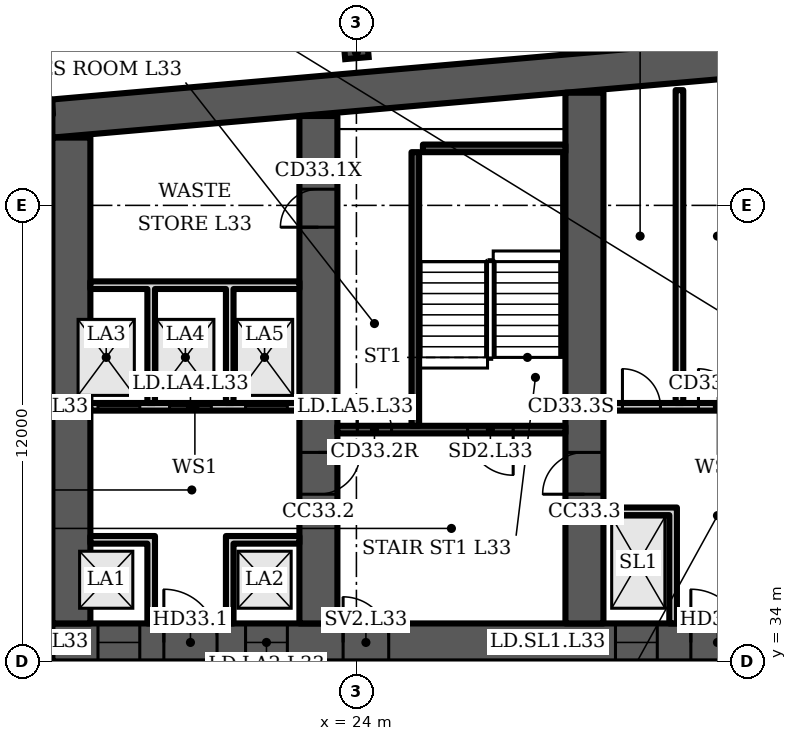
"""IFC4 building model, lengths in metres.
Left out: names, types, materials, properties, quantities, classifications, styles, units other than length and angle.
Written with IfcOpenShell. Run it as: python <this file> out.ifc"""

import sys

from ifc_helpers import new_model, si_unit, direction, frame, frame_2d, origin, origin_2d, place, context, subcontext, project, spatial, polyline, rectangle, i_section, outline, extrude, element, fill, save


model = new_model("IFC4")
c1 = context("Model", 3, precision=1e-05, world=origin(), true_north=direction((0.0, 1.0)))
c2 = subcontext(c1, "Body", "Model", "MODEL_VIEW")
j1 = project(units=[si_unit("LENGTHUNIT", "METRE"), si_unit("PLANEANGLEUNIT", "RADIAN")], contexts=[c1])
p1 = place(None, origin())
s1 = spatial("IfcSite", under=j1, at=p1, CompositionType="ELEMENT")
p2 = place(p1, origin())
s2 = spatial("IfcBuilding", under=s1, at=p2, CompositionType="ELEMENT")
p3 = place(p2, frame((0.0, 0.0, 139.9)))
s3 = spatial("IfcBuildingStorey", under=s2, at=p3, CompositionType="ELEMENT", Elevation=139.9)
p4 = place(p3, origin())
e1 = element("IfcWall", 1, at=p4, inside=s3, PredefinedType="SHEAR", context=c2, shape_type="SweptSolid", body=[
    extrude(outline(polyline([(16.0, 47.784), (40.5, 49.927), (65.0, 47.784), (65.0, 48.787), (40.5, 50.931), (16.0, 48.787), (16.0, 47.784)])), origin(), (0.0, 0.0, 1.0), 3.6),
])
p5 = place(p3, frame((16.0, 34.5, 0.0), z_axis=(0.0, 0.0, 1.0), x_axis=(1.0, 0.0, 0.0)))
e2 = element("IfcWall", 2, at=p5, inside=s3, PredefinedType="SHEAR", context=c2, shape_type="SweptSolid", body=[
    extrude(rectangle(XDim=49.0, YDim=1.0, at=frame_2d((24.5, 0.0))), origin(), (0.0, 0.0, 1.0), 3.6),
])
p6 = place(p5, frame((1.2, 0.0, 0.0)))
e3 = element("IfcOpeningElement", 3, at=p6, cuts=e2, PredefinedType="OPENING", context=c2, shape_type="SweptSolid", body=[
    extrude(rectangle(XDim=1.1, YDim=2.1, at=frame_2d((0.55, 1.05))), frame((0.0, 0.51, 0.0), z_axis=(0.0, -1.0, 0.0), x_axis=(1.0, 0.0, 0.0)), (0.0, 0.0, 1.0), 1.02),
])
p7 = place(p5, frame((5.083, 0.0, 0.0)))
e4 = element("IfcOpeningElement", 4, at=p7, cuts=e2, PredefinedType="OPENING", context=c2, shape_type="SweptSolid", body=[
    extrude(rectangle(XDim=1.1, YDim=2.1, at=frame_2d((0.55, 1.05))), frame((0.0, 0.51, 0.0), z_axis=(0.0, -1.0, 0.0), x_axis=(1.0, 0.0, 0.0)), (0.0, 0.0, 1.0), 1.02),
])
p8 = place(p5, frame((2.933, 0.0, 0.0)))
e5 = element("IfcOpeningElement", 5, at=p8, cuts=e2, PredefinedType="OPENING", context=c2, shape_type="SweptSolid", body=[
    extrude(rectangle(XDim=1.4, YDim=2.1, at=frame_2d((0.7, 1.05))), frame((0.0, 0.51, 0.0), z_axis=(0.0, -1.0, 0.0), x_axis=(1.0, 0.0, 0.0)), (0.0, 0.0, 1.0), 1.02),
])
p9 = place(p5, frame((7.65, 0.0, 0.0)))
e6 = element("IfcOpeningElement", 6, at=p9, cuts=e2, PredefinedType="OPENING", context=c2, shape_type="SweptSolid", body=[
    extrude(rectangle(XDim=1.2, YDim=2.1, at=frame_2d((0.6, 1.05))), frame((0.0, 0.51, 0.0), z_axis=(0.0, -1.0, 0.0), x_axis=(1.0, 0.0, 0.0)), (0.0, 0.0, 1.0), 1.02),
])
p10 = place(p5, frame((14.817, 0.0, 0.0)))
e7 = element("IfcOpeningElement", 7, at=p10, cuts=e2, PredefinedType="OPENING", context=c2, shape_type="SweptSolid", body=[
    extrude(rectangle(XDim=1.1, YDim=2.1, at=frame_2d((0.55, 1.05))), frame((0.0, 0.51, 0.0), z_axis=(0.0, -1.0, 0.0), x_axis=(1.0, 0.0, 0.0)), (0.0, 0.0, 1.0), 1.02),
])
p11 = place(p5, frame((19.083, 0.0, 0.0)))
e8 = element("IfcOpeningElement", 8, at=p11, cuts=e2, PredefinedType="OPENING", context=c2, shape_type="SweptSolid", body=[
    extrude(rectangle(XDim=1.1, YDim=2.1, at=frame_2d((0.55, 1.05))), frame((0.0, 0.51, 0.0), z_axis=(0.0, -1.0, 0.0), x_axis=(1.0, 0.0, 0.0)), (0.0, 0.0, 1.0), 1.02),
])
p12 = place(p5, frame((16.8, 0.0, 0.0)))
e9 = element("IfcOpeningElement", 9, at=p12, cuts=e2, PredefinedType="OPENING", context=c2, shape_type="SweptSolid", body=[
    extrude(rectangle(XDim=1.4, YDim=2.1, at=frame_2d((0.7, 1.05))), frame((0.0, 0.51, 0.0), z_axis=(0.0, -1.0, 0.0), x_axis=(1.0, 0.0, 0.0)), (0.0, 0.0, 1.0), 1.02),
])
p13 = place(p5, frame((21.817, 0.0, 0.0)))
e10 = element("IfcOpeningElement", 10, at=p13, cuts=e2, PredefinedType="OPENING", context=c2, shape_type="SweptSolid", body=[
    extrude(rectangle(XDim=1.1, YDim=2.1, at=frame_2d((0.55, 1.05))), frame((0.0, 0.51, 0.0), z_axis=(0.0, -1.0, 0.0), x_axis=(1.0, 0.0, 0.0)), (0.0, 0.0, 1.0), 1.02),
])
p14 = place(p5, frame((26.083, 0.0, 0.0)))
e11 = element("IfcOpeningElement", 11, at=p14, cuts=e2, PredefinedType="OPENING", context=c2, shape_type="SweptSolid", body=[
    extrude(rectangle(XDim=1.1, YDim=2.1, at=frame_2d((0.55, 1.05))), frame((0.0, 0.51, 0.0), z_axis=(0.0, -1.0, 0.0), x_axis=(1.0, 0.0, 0.0)), (0.0, 0.0, 1.0), 1.02),
])
p15 = place(p5, frame((33.15, 0.0, 0.0)))
e12 = element("IfcOpeningElement", 12, at=p15, cuts=e2, PredefinedType="OPENING", context=c2, shape_type="SweptSolid", body=[
    extrude(rectangle(XDim=1.2, YDim=2.1, at=frame_2d((0.6, 1.05))), frame((0.0, 0.51, 0.0), z_axis=(0.0, -1.0, 0.0), x_axis=(1.0, 0.0, 0.0)), (0.0, 0.0, 1.0), 1.02),
])
p16 = place(p5, frame((37.8, 0.0, 0.0)))
e13 = element("IfcOpeningElement", 13, at=p16, cuts=e2, PredefinedType="OPENING", context=c2, shape_type="SweptSolid", body=[
    extrude(rectangle(XDim=1.4, YDim=2.1, at=frame_2d((0.7, 1.05))), frame((0.0, 0.51, 0.0), z_axis=(0.0, -1.0, 0.0), x_axis=(1.0, 0.0, 0.0)), (0.0, 0.0, 1.0), 1.02),
])
p17 = place(p5, frame((42.817, 0.0, 0.0)))
e14 = element("IfcOpeningElement", 14, at=p17, cuts=e2, PredefinedType="OPENING", context=c2, shape_type="SweptSolid", body=[
    extrude(rectangle(XDim=1.1, YDim=2.1, at=frame_2d((0.55, 1.05))), frame((0.0, 0.51, 0.0), z_axis=(0.0, -1.0, 0.0), x_axis=(1.0, 0.0, 0.0)), (0.0, 0.0, 1.0), 1.02),
])
p18 = place(p5, frame((46.7, 0.0, 0.0)))
e15 = element("IfcOpeningElement", 15, at=p18, cuts=e2, PredefinedType="OPENING", context=c2, shape_type="SweptSolid", body=[
    extrude(rectangle(XDim=1.1, YDim=2.1, at=frame_2d((0.55, 1.05))), frame((0.0, 0.51, 0.0), z_axis=(0.0, -1.0, 0.0), x_axis=(1.0, 0.0, 0.0)), (0.0, 0.0, 1.0), 1.02),
])
p19 = place(p5, frame((44.667, 0.0, 0.0)))
e16 = element("IfcOpeningElement", 16, at=p19, cuts=e2, PredefinedType="OPENING", context=c2, shape_type="SweptSolid", body=[
    extrude(rectangle(XDim=1.4, YDim=2.1, at=frame_2d((0.7, 1.05))), frame((0.0, 0.51, 0.0), z_axis=(0.0, -1.0, 0.0), x_axis=(1.0, 0.0, 0.0)), (0.0, 0.0, 1.0), 1.02),
])
p20 = place(p3, frame((16.5, 35.0, 0.0), z_axis=(0.0, 0.0, 1.0), x_axis=(0.0, 1.0, 0.0)))
e17 = element("IfcWall", 17, at=p20, inside=s3, PredefinedType="SHEAR", context=c2, shape_type="SweptSolid", body=[
    extrude(rectangle(XDim=12.784, YDim=1.0, at=frame_2d((6.392, 0.0))), origin(), (0.0, 0.0, 1.0), 3.6),
])
p21 = place(p3, frame((23.0, 35.0, 0.0), z_axis=(0.0, 0.0, 1.0), x_axis=(0.0, 1.0, 0.0)))
e18 = element("IfcWall", 18, at=p21, inside=s3, PredefinedType="SHEAR", context=c2, shape_type="SweptSolid", body=[
    extrude(rectangle(XDim=13.352, YDim=1.0, at=frame_2d((6.676, 0.0))), origin(), (0.0, 0.0, 1.0), 3.6),
])
p22 = place(p21, frame((10.426, 0.0, 0.0)))
e19 = element("IfcOpeningElement", 19, at=p22, cuts=e18, PredefinedType="OPENING", context=c2, shape_type="SweptSolid", body=[
    extrude(rectangle(XDim=1.0, YDim=2.1, at=frame_2d((0.5, 1.05))), frame((0.0, 0.51, 0.0), z_axis=(0.0, -1.0, 0.0), x_axis=(1.0, 0.0, 0.0)), (0.0, 0.0, 1.0), 1.02),
])
p23 = place(p21, frame((3.4, 0.0, 0.0)))
e20 = element("IfcOpeningElement", 20, at=p23, cuts=e18, PredefinedType="OPENING", context=c2, shape_type="SweptSolid", body=[
    extrude(rectangle(XDim=1.1, YDim=2.1, at=frame_2d((0.55, 1.05))), frame((0.0, 0.51, 0.0), z_axis=(0.0, -1.0, 0.0), x_axis=(1.0, 0.0, 0.0)), (0.0, 0.0, 1.0), 1.02),
])
p24 = place(p3, frame((30.0, 35.0, 0.0), z_axis=(0.0, 0.0, 1.0), x_axis=(0.0, 1.0, 0.0)))
e21 = element("IfcWall", 21, at=p24, inside=s3, PredefinedType="SHEAR", context=c2, shape_type="SweptSolid", body=[
    extrude(rectangle(XDim=13.965, YDim=1.0, at=frame_2d((6.982, 0.0))), origin(), (0.0, 0.0, 1.0), 3.6),
])
p25 = place(p24, frame((3.4, 0.0, 0.0)))
e22 = element("IfcOpeningElement", 22, at=p25, cuts=e21, PredefinedType="OPENING", context=c2, shape_type="SweptSolid", body=[
    extrude(rectangle(XDim=1.1, YDim=2.1, at=frame_2d((0.55, 1.05))), frame((0.0, 0.51, 0.0), z_axis=(0.0, -1.0, 0.0), x_axis=(1.0, 0.0, 0.0)), (0.0, 0.0, 1.0), 1.02),
])
p26 = place(p3, frame((24.0, 50.027, 0.0), z_axis=(0.0, 0.0, 1.0), x_axis=(-0.087156, 0.996198, 0.0)))
e23 = element("IfcColumn", 23, at=p26, inside=s3, PredefinedType="COLUMN", context=c2, shape_type="SweptSolid", body=[
    extrude(i_section(OverallWidth=0.305, OverallDepth=0.62, WebThickness=0.021, FlangeThickness=0.04, FilletRadius=0.027, at=origin_2d()), origin(), (0.0, 0.0, 1.0), 3.6),
])
p27 = place(p3, frame((16.0, 48.587, 0.0), z_axis=(0.0, 0.0, 1.0), x_axis=(-0.996194, -0.087168, 0.0)))
e24 = element("IfcWall", 24, at=p27, inside=s3, PredefinedType="SOLIDWALL", context=c2, shape_type="SweptSolid", body=[
    extrude(rectangle(XDim=2.994, YDim=0.4, at=frame_2d((1.497, 0.0))), origin(), (0.0, 0.0, 1.0), 3.2),
])
p28 = place(p3, frame((17.0, 40.7, 0.0), z_axis=(0.0, 0.0, 1.0), x_axis=(1.0, 0.0, 0.0)))
e25 = element("IfcWall", 25, at=p28, inside=s3, PredefinedType="PARTITIONING", context=c2, shape_type="SweptSolid", body=[
    extrude(rectangle(XDim=5.5, YDim=0.2, at=frame_2d((2.75, 0.0))), origin(), (0.0, 0.0, 1.0), 3.2),
])
p29 = place(p28, frame((0.2, 0.0, 0.0)))
e26 = element("IfcOpeningElement", 26, at=p29, cuts=e25, PredefinedType="OPENING", context=c2, shape_type="SweptSolid", body=[
    extrude(rectangle(XDim=1.1, YDim=2.1, at=frame_2d((0.55, 1.05))), frame((0.0, 0.11, 0.0), z_axis=(0.0, -1.0, 0.0), x_axis=(1.0, 0.0, 0.0)), (0.0, 0.0, 1.0), 0.22),
])
p30 = place(p28, frame((2.083, 0.0, 0.0)))
e27 = element("IfcOpeningElement", 27, at=p30, cuts=e25, PredefinedType="OPENING", context=c2, shape_type="SweptSolid", body=[
    extrude(rectangle(XDim=1.1, YDim=2.1, at=frame_2d((0.55, 1.05))), frame((0.0, 0.11, 0.0), z_axis=(0.0, -1.0, 0.0), x_axis=(1.0, 0.0, 0.0)), (0.0, 0.0, 1.0), 0.22),
])
p31 = place(p28, frame((4.083, 0.0, 0.0)))
e28 = element("IfcOpeningElement", 28, at=p31, cuts=e25, PredefinedType="OPENING", context=c2, shape_type="SweptSolid", body=[
    extrude(rectangle(XDim=1.1, YDim=2.1, at=frame_2d((0.55, 1.05))), frame((0.0, 0.11, 0.0), z_axis=(0.0, -1.0, 0.0), x_axis=(1.0, 0.0, 0.0)), (0.0, 0.0, 1.0), 0.22),
])
p32 = place(p3, origin())
e29 = element("IfcWall", 29, at=p32, inside=s3, PredefinedType="PARTITIONING", context=c2, shape_type="SweptSolid", body=[
    extrude(outline(polyline([(18.5, 37.1), (17.0, 37.1), (17.0, 37.3), (18.5, 37.3), (18.7, 37.3), (18.7, 35.0), (18.5, 35.0), (18.5, 37.1)])), origin(), (0.0, 0.0, 1.0), 3.2),
])
p33 = place(p3, origin())
e30 = element("IfcWall", 30, at=p33, inside=s3, PredefinedType="PARTITIONING", context=c2, shape_type="SweptSolid", body=[
    extrude(outline(polyline([(20.567, 37.3), (20.767, 37.3), (22.5, 37.3), (22.5, 37.1), (20.767, 37.1), (20.767, 35.0), (20.567, 35.0), (20.567, 37.3)])), origin(), (0.0, 0.0, 1.0), 3.2),
])
p34 = place(p3, origin())
e31 = element("IfcWall", 31, at=p34, inside=s3, PredefinedType="PARTITIONING", context=c2, shape_type="SweptSolid", body=[
    extrude(outline(polyline([(18.7, 40.8), (18.5, 40.8), (18.5, 43.8), (17.0, 43.8), (17.0, 44.0), (22.5, 44.0), (22.5, 43.8), (20.767, 43.8), (20.767, 40.8), (20.567, 40.8), (20.567, 43.8), (18.7, 43.8), (18.7, 40.8)])), origin(), (0.0, 0.0, 1.0), 3.2),
])
p35 = place(p3, frame((23.5, 40.1, 0.0), z_axis=(0.0, 0.0, 1.0), x_axis=(1.0, 0.0, 0.0)))
e32 = element("IfcWall", 32, at=p35, inside=s3, PredefinedType="SHEAR", context=c2, shape_type="SweptSolid", body=[
    extrude(rectangle(XDim=6.0, YDim=0.2, at=frame_2d((3.0, 0.0))), origin(), (0.0, 0.0, 1.0), 3.2),
])
p36 = place(p35, frame((3.425, 0.0, 0.0)))
e33 = element("IfcOpeningElement", 33, at=p36, cuts=e32, PredefinedType="OPENING", context=c2, shape_type="SweptSolid", body=[
    extrude(rectangle(XDim=1.2, YDim=2.1, at=frame_2d((0.6, 1.05))), frame((0.0, 0.11, 0.0), z_axis=(0.0, -1.0, 0.0), x_axis=(1.0, 0.0, 0.0)), (0.0, 0.0, 1.0), 0.22),
])
p37 = place(p35, frame((0.525, 0.0, 0.0)))
e34 = element("IfcOpeningElement", 34, at=p37, cuts=e32, PredefinedType="OPENING", context=c2, shape_type="SweptSolid", body=[
    extrude(rectangle(XDim=0.9, YDim=2.1, at=frame_2d((0.45, 1.05))), frame((0.0, 0.11, 0.0), z_axis=(0.0, -1.0, 0.0), x_axis=(1.0, 0.0, 0.0)), (0.0, 0.0, 1.0), 0.22),
])
p38 = place(p3, frame((25.55, 40.2, 0.0), z_axis=(0.0, 0.0, 1.0), x_axis=(0.0, 1.0, 0.0)))
e35 = element("IfcWall", 35, at=p38, inside=s3, PredefinedType="SHEAR", context=c2, shape_type="SweptSolid", body=[
    extrude(rectangle(XDim=7.2, YDim=0.2, at=frame_2d((3.6, 0.0))), origin(), (0.0, 0.0, 1.0), 3.2),
])
p39 = place(p3, frame((25.75, 47.5, 0.0), z_axis=(0.0, 0.0, 1.0), x_axis=(1.0, 0.0, 0.0)))
e36 = element("IfcWall", 36, at=p39, inside=s3, PredefinedType="SHEAR", context=c2, shape_type="SweptSolid", body=[
    extrude(rectangle(XDim=3.75, YDim=0.2, at=frame_2d((1.875, 0.0))), origin(), (0.0, 0.0, 1.0), 3.2),
])
p40 = place(p3, frame((30.5, 40.7, 0.0), z_axis=(0.0, 0.0, 1.0), x_axis=(1.0, 0.0, 0.0)))
e37 = element("IfcWall", 37, at=p40, inside=s3, PredefinedType="PARTITIONING", context=c2, shape_type="SweptSolid", body=[
    extrude(rectangle(XDim=6.0, YDim=0.2, at=frame_2d((3.0, 0.0))), origin(), (0.0, 0.0, 1.0), 3.2),
])
p41 = place(p40, frame((0.5, 0.0, 0.0)))
e38 = element("IfcOpeningElement", 38, at=p41, cuts=e37, PredefinedType="OPENING", context=c2, shape_type="SweptSolid", body=[
    extrude(rectangle(XDim=1.0, YDim=2.1, at=frame_2d((0.5, 1.05))), frame((0.0, 0.11, 0.0), z_axis=(0.0, -1.0, 0.0), x_axis=(1.0, 0.0, 0.0)), (0.0, 0.0, 1.0), 0.22),
])
p42 = place(p40, frame((2.5, 0.0, 0.0)))
e39 = element("IfcOpeningElement", 39, at=p42, cuts=e37, PredefinedType="OPENING", context=c2, shape_type="SweptSolid", body=[
    extrude(rectangle(XDim=1.0, YDim=2.1, at=frame_2d((0.5, 1.05))), frame((0.0, 0.11, 0.0), z_axis=(0.0, -1.0, 0.0), x_axis=(1.0, 0.0, 0.0)), (0.0, 0.0, 1.0), 0.22),
])
p43 = place(p40, frame((4.5, 0.0, 0.0)))
e40 = element("IfcOpeningElement", 40, at=p43, cuts=e37, PredefinedType="OPENING", context=c2, shape_type="SweptSolid", body=[
    extrude(rectangle(XDim=1.0, YDim=2.1, at=frame_2d((0.5, 1.05))), frame((0.0, 0.11, 0.0), z_axis=(0.0, -1.0, 0.0), x_axis=(1.0, 0.0, 0.0)), (0.0, 0.0, 1.0), 0.22),
])
p44 = place(p3, origin())
e41 = element("IfcWall", 41, at=p44, inside=s3, PredefinedType="PARTITIONING", context=c2, shape_type="SweptSolid", body=[
    extrude(outline(polyline([(32.233, 37.85), (30.5, 37.85), (30.5, 38.05), (32.233, 38.05), (32.433, 38.05), (32.433, 35.0), (32.233, 35.0), (32.233, 37.85)])), origin(), (0.0, 0.0, 1.0), 3.2),
])
p45 = place(p3, frame((32.5, 40.8, 0.0), z_axis=(0.0, 0.0, 1.0), x_axis=(0.0, 1.0, 0.0)))
e42 = element("IfcWall", 42, at=p45, inside=s3, PredefinedType="PARTITIONING", context=c2, shape_type="SweptSolid", body=[
    extrude(rectangle(XDim=8.232, YDim=0.2, at=frame_2d((4.116, 0.0))), origin(), (0.0, 0.0, 1.0), 3.2),
])
p46 = place(p6, origin())
e43 = element("IfcDoor", 43, at=p46, inside=s3, OperationType="DOUBLE_DOOR_SLIDING", PredefinedType="DOOR", context=c2, shape_type="SweptSolid", body=[
    extrude(rectangle(XDim=1.1, YDim=2.1, at=frame_2d((0.55, 1.05))), frame((0.0, 0.025, 0.0), z_axis=(0.0, -1.0, 0.0), x_axis=(1.0, 0.0, 0.0)), (0.0, 0.0, 1.0), 0.05),
])
fill(e3, e43)
p47 = place(p7, origin())
e44 = element("IfcDoor", 44, at=p47, inside=s3, OperationType="DOUBLE_DOOR_SLIDING", PredefinedType="DOOR", context=c2, shape_type="SweptSolid", body=[
    extrude(rectangle(XDim=1.1, YDim=2.1, at=frame_2d((0.55, 1.05))), frame((0.0, 0.025, 0.0), z_axis=(0.0, -1.0, 0.0), x_axis=(1.0, 0.0, 0.0)), (0.0, 0.0, 1.0), 0.05),
])
fill(e4, e44)
p48 = place(p8, origin())
e45 = element("IfcDoor", 45, at=p48, inside=s3, OperationType="DOUBLE_DOOR_SINGLE_SWING", PredefinedType="DOOR", context=c2, shape_type="SweptSolid", body=[
    extrude(rectangle(XDim=1.4, YDim=2.1, at=frame_2d((0.7, 1.05))), frame((0.0, 0.025, 0.0), z_axis=(0.0, -1.0, 0.0), x_axis=(1.0, 0.0, 0.0)), (0.0, 0.0, 1.0), 0.05),
])
fill(e5, e45)
p49 = place(p29, origin())
e46 = element("IfcDoor", 46, at=p49, inside=s3, OperationType="DOUBLE_DOOR_SLIDING", PredefinedType="DOOR", context=c2, shape_type="SweptSolid", body=[
    extrude(rectangle(XDim=1.1, YDim=2.1, at=frame_2d((0.55, 1.05))), frame((0.0, 0.025, 0.0), z_axis=(0.0, -1.0, 0.0), x_axis=(1.0, 0.0, 0.0)), (0.0, 0.0, 1.0), 0.05),
])
fill(e26, e46)
p50 = place(p30, origin())
e47 = element("IfcDoor", 47, at=p50, inside=s3, OperationType="DOUBLE_DOOR_SLIDING", PredefinedType="DOOR", context=c2, shape_type="SweptSolid", body=[
    extrude(rectangle(XDim=1.1, YDim=2.1, at=frame_2d((0.55, 1.05))), frame((0.0, 0.025, 0.0), z_axis=(0.0, -1.0, 0.0), x_axis=(1.0, 0.0, 0.0)), (0.0, 0.0, 1.0), 0.05),
])
fill(e27, e47)
p51 = place(p31, origin())
e48 = element("IfcDoor", 48, at=p51, inside=s3, OperationType="DOUBLE_DOOR_SLIDING", PredefinedType="DOOR", context=c2, shape_type="SweptSolid", body=[
    extrude(rectangle(XDim=1.1, YDim=2.1, at=frame_2d((0.55, 1.05))), frame((0.0, 0.025, 0.0), z_axis=(0.0, -1.0, 0.0), x_axis=(1.0, 0.0, 0.0)), (0.0, 0.0, 1.0), 0.05),
])
fill(e28, e48)
p52 = place(p22, origin())
e49 = element("IfcDoor", 49, at=p52, inside=s3, OperationType="SINGLE_SWING_LEFT", PredefinedType="DOOR", context=c2, shape_type="SweptSolid", body=[
    extrude(rectangle(XDim=1.0, YDim=2.1, at=frame_2d((0.5, 1.05))), frame((0.0, 0.5, 0.0), z_axis=(0.0, -1.0, 0.0), x_axis=(1.0, 0.0, 0.0)), (0.0, 0.0, 1.0), 1.0),
])
fill(e19, e49)
p53 = place(p36, origin())
e50 = element("IfcDoor", 50, at=p53, inside=s3, OperationType="SINGLE_SWING_RIGHT", PredefinedType="DOOR", context=c2, shape_type="SweptSolid", body=[
    extrude(rectangle(XDim=1.2, YDim=2.1, at=frame_2d((0.6, 1.05))), frame((0.0, 0.025, 0.0), z_axis=(0.0, -1.0, 0.0), x_axis=(1.0, 0.0, 0.0)), (0.0, 0.0, 1.0), 0.05),
])
fill(e33, e50)
p54 = place(p37, origin())
e51 = element("IfcDoor", 51, at=p54, inside=s3, OperationType="SINGLE_SWING_LEFT", PredefinedType="DOOR", context=c2, shape_type="SweptSolid", body=[
    extrude(rectangle(XDim=0.9, YDim=2.1, at=frame_2d((0.45, 1.05))), frame((0.0, 0.025, 0.0), z_axis=(0.0, -1.0, 0.0), x_axis=(1.0, 0.0, 0.0)), (0.0, 0.0, 1.0), 0.05),
])
fill(e34, e51)
p55 = place(p9, origin())
e52 = element("IfcDoor", 52, at=p55, inside=s3, OperationType="SINGLE_SWING_LEFT", PredefinedType="DOOR", context=c2, shape_type="SweptSolid", body=[
    extrude(rectangle(XDim=1.2, YDim=2.1, at=frame_2d((0.6, 1.05))), frame((0.0, 0.025, 0.0), z_axis=(0.0, -1.0, 0.0), x_axis=(1.0, 0.0, 0.0)), (0.0, 0.0, 1.0), 0.05),
])
fill(e6, e52)
p56 = place(p10, origin())
e53 = element("IfcDoor", 53, at=p56, inside=s3, OperationType="DOUBLE_DOOR_SLIDING", PredefinedType="DOOR", context=c2, shape_type="SweptSolid", body=[
    extrude(rectangle(XDim=1.1, YDim=2.1, at=frame_2d((0.55, 1.05))), frame((0.0, 0.025, 0.0), z_axis=(0.0, -1.0, 0.0), x_axis=(1.0, 0.0, 0.0)), (0.0, 0.0, 1.0), 0.05),
])
fill(e7, e53)
p57 = place(p12, origin())
e54 = element("IfcDoor", 54, at=p57, inside=s3, OperationType="DOUBLE_DOOR_SINGLE_SWING", PredefinedType="DOOR", context=c2, shape_type="SweptSolid", body=[
    extrude(rectangle(XDim=1.4, YDim=2.1, at=frame_2d((0.7, 1.05))), frame((0.0, 0.025, 0.0), z_axis=(0.0, -1.0, 0.0), x_axis=(1.0, 0.0, 0.0)), (0.0, 0.0, 1.0), 0.05),
])
fill(e9, e54)
p58 = place(p41, origin())
e55 = element("IfcDoor", 55, at=p58, inside=s3, OperationType="SINGLE_SWING_LEFT", PredefinedType="DOOR", context=c2, shape_type="SweptSolid", body=[
    extrude(rectangle(XDim=1.0, YDim=2.1, at=frame_2d((0.5, 1.05))), frame((0.0, 0.025, 0.0), z_axis=(0.0, -1.0, 0.0), x_axis=(1.0, 0.0, 0.0)), (0.0, 0.0, 1.0), 0.05),
])
fill(e38, e55)
p59 = place(p42, origin())
e56 = element("IfcDoor", 56, at=p59, inside=s3, OperationType="SINGLE_SWING_LEFT", PredefinedType="DOOR", context=c2, shape_type="SweptSolid", body=[
    extrude(rectangle(XDim=1.0, YDim=2.1, at=frame_2d((0.5, 1.05))), frame((0.0, 0.025, 0.0), z_axis=(0.0, -1.0, 0.0), x_axis=(1.0, 0.0, 0.0)), (0.0, 0.0, 1.0), 0.05),
])
fill(e39, e56)
p60 = place(p23, origin())
e57 = element("IfcDoor", 57, at=p60, inside=s3, OperationType="SINGLE_SWING_RIGHT", PredefinedType="DOOR", context=c2, shape_type="SweptSolid", body=[
    extrude(rectangle(XDim=1.1, YDim=2.1, at=frame_2d((0.55, 1.05))), frame((0.0, 0.025, 0.0), z_axis=(0.0, -1.0, 0.0), x_axis=(1.0, 0.0, 0.0)), (0.0, 0.0, 1.0), 0.05),
])
fill(e20, e57)
p61 = place(p25, origin())
e58 = element("IfcDoor", 58, at=p61, inside=s3, OperationType="SINGLE_SWING_LEFT", PredefinedType="DOOR", context=c2, shape_type="SweptSolid", body=[
    extrude(rectangle(XDim=1.1, YDim=2.1, at=frame_2d((0.55, 1.05))), frame((0.0, 0.025, 0.0), z_axis=(0.0, -1.0, 0.0), x_axis=(1.0, 0.0, 0.0)), (0.0, 0.0, 1.0), 0.05),
])
fill(e22, e58)
save(model, sys.argv[1])
